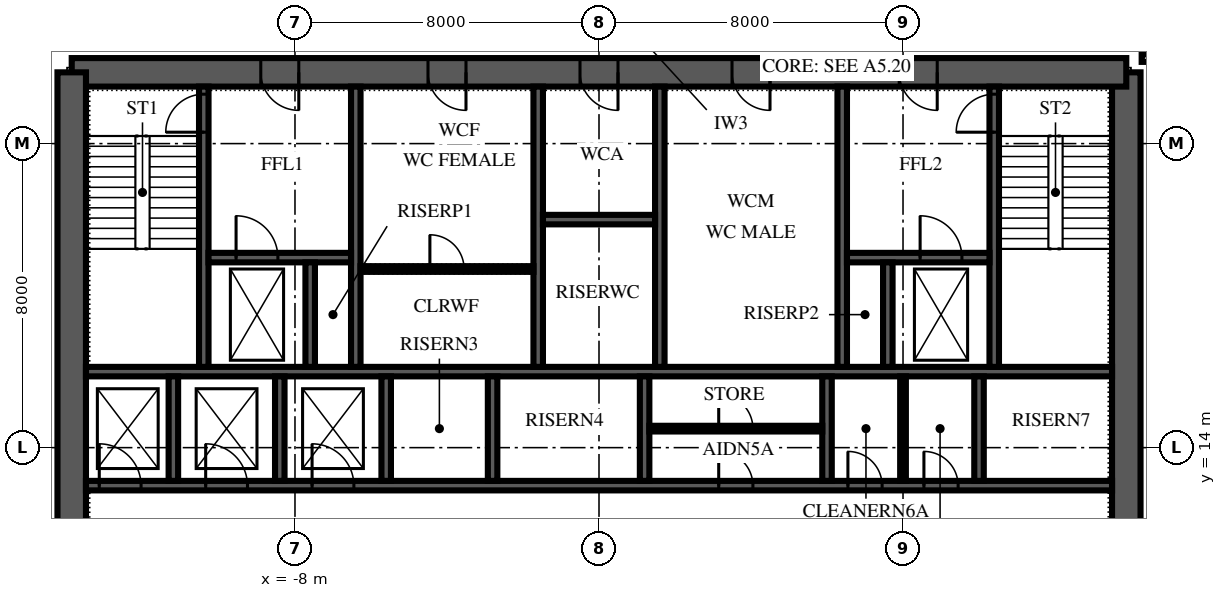
"""IFC4 building model, lengths in metres.
Left out: names, types, materials, properties, quantities, classifications, styles, units other than length and angle.
Written with IfcOpenShell. Run it as: python <this file> out.ifc"""

import sys

from ifc_helpers import new_model, si_unit, direction, frame, frame_2d, origin, place, context, subcontext, project, spatial, polyline, rectangle, outline, extrude, element, fill, save


model = new_model("IFC4")
c1 = context("Model", 3, precision=1e-05, world=origin(), true_north=direction((0.0, 1.0)))
c2 = subcontext(c1, "Body", "Model", "MODEL_VIEW")
j1 = project(units=[si_unit("LENGTHUNIT", "METRE"), si_unit("PLANEANGLEUNIT", "RADIAN")], contexts=[c1])
p1 = place(None, origin())
s1 = spatial("IfcSite", under=j1, at=p1, CompositionType="ELEMENT")
p2 = place(p1, origin())
s2 = spatial("IfcBuilding", under=s1, at=p2, CompositionType="ELEMENT")
p3 = place(p2, frame((0.0, 0.0, 139.0)))
s3 = spatial("IfcBuildingStorey", under=s2, at=p3, CompositionType="ELEMENT", Elevation=139.0)
p4 = place(p3, frame((13.875, 6.125, 0.0), z_axis=(0.0, 0.0, 1.0), x_axis=(0.0, 1.0, 0.0)))
e1 = element("IfcWall", 1, at=p4, inside=s3, PredefinedType="SHEAR", context=c2, shape_type="SweptSolid", body=[
    extrude(outline(polyline([(0.0, -0.375), (17.75, -0.375), (17.75, 0.0), (17.375, 0.0), (17.375, 0.375), (0.375, 0.375), (0.375, 0.0), (0.0, 0.0), (0.0, -0.375)])), origin(), (0.0, 0.0, 1.0), 4.0),
])
p5 = place(p4, frame((4.175, 0.0, 0.0)))
e2 = element("IfcOpeningElement", 2, at=p5, cuts=e1, PredefinedType="OPENING", context=c2, shape_type="SweptSolid", body=[
    extrude(rectangle(XDim=1.8, YDim=2.4, at=frame_2d((0.9, 1.2))), frame((0.0, 0.39, 0.0), z_axis=(0.0, -1.0, 0.0), x_axis=(1.0, 0.0, 0.0)), (0.0, 0.0, 1.0), 0.78),
])
p6 = place(p3, frame((13.875, 23.875, 0.0), z_axis=(0.0, 0.0, 1.0), x_axis=(-1.0, 0.0, 0.0)))
e3 = element("IfcWall", 3, at=p6, inside=s3, PredefinedType="SHEAR", context=c2, shape_type="SweptSolid", body=[
    extrude(rectangle(XDim=27.75, YDim=0.75, at=frame_2d((13.875, 0.0))), origin(), (0.0, 0.0, 1.0), 4.0),
])
p7 = place(p6, frame((21.775, 0.0, 0.0)))
e4 = element("IfcOpeningElement", 4, at=p7, cuts=e3, PredefinedType="OPENING", context=c2, shape_type="SweptSolid", body=[
    extrude(rectangle(XDim=1.0, YDim=2.1, at=frame_2d((0.5, 1.05))), frame((0.0, 0.39, 0.0), z_axis=(0.0, -1.0, 0.0), x_axis=(1.0, 0.0, 0.0)), (0.0, 0.0, 1.0), 0.78),
])
p8 = place(p6, frame((4.975, 0.0, 0.0)))
e5 = element("IfcOpeningElement", 5, at=p8, cuts=e3, PredefinedType="OPENING", context=c2, shape_type="SweptSolid", body=[
    extrude(rectangle(XDim=1.0, YDim=2.1, at=frame_2d((0.5, 1.05))), frame((0.0, 0.39, 0.0), z_axis=(0.0, -1.0, 0.0), x_axis=(1.0, 0.0, 0.0)), (0.0, 0.0, 1.0), 0.78),
])
p9 = place(p6, frame((17.375, 0.0, 0.0)))
e6 = element("IfcOpeningElement", 6, at=p9, cuts=e3, PredefinedType="OPENING", context=c2, shape_type="SweptSolid", body=[
    extrude(rectangle(XDim=1.0, YDim=2.1, at=frame_2d((0.5, 1.05))), frame((0.0, 0.39, 0.0), z_axis=(0.0, -1.0, 0.0), x_axis=(1.0, 0.0, 0.0)), (0.0, 0.0, 1.0), 0.78),
])
p10 = place(p6, frame((13.375, 0.0, 0.0)))
e7 = element("IfcOpeningElement", 7, at=p10, cuts=e3, PredefinedType="OPENING", context=c2, shape_type="SweptSolid", body=[
    extrude(rectangle(XDim=1.0, YDim=2.1, at=frame_2d((0.5, 1.05))), frame((0.0, 0.39, 0.0), z_axis=(0.0, -1.0, 0.0), x_axis=(1.0, 0.0, 0.0)), (0.0, 0.0, 1.0), 0.78),
])
p11 = place(p6, frame((9.375, 0.0, 0.0)))
e8 = element("IfcOpeningElement", 8, at=p11, cuts=e3, PredefinedType="OPENING", context=c2, shape_type="SweptSolid", body=[
    extrude(rectangle(XDim=1.0, YDim=2.1, at=frame_2d((0.5, 1.05))), frame((0.0, 0.39, 0.0), z_axis=(0.0, -1.0, 0.0), x_axis=(1.0, 0.0, 0.0)), (0.0, 0.0, 1.0), 0.78),
])
p12 = place(p3, frame((-13.875, 23.875, 0.0), z_axis=(0.0, 0.0, 1.0), x_axis=(0.0, -1.0, 0.0)))
e9 = element("IfcWall", 9, at=p12, inside=s3, PredefinedType="SHEAR", context=c2, shape_type="SweptSolid", body=[
    extrude(outline(polyline([(0.0, -0.375), (17.75, -0.375), (17.75, 0.0), (17.375, 0.0), (17.375, 0.375), (0.375, 0.375), (0.375, 0.0), (0.0, 0.0), (0.0, -0.375)])), origin(), (0.0, 0.0, 1.0), 4.0),
])
p13 = place(p12, frame((11.775, 0.0, 0.0)))
e10 = element("IfcOpeningElement", 10, at=p13, cuts=e9, PredefinedType="OPENING", context=c2, shape_type="SweptSolid", body=[
    extrude(rectangle(XDim=1.8, YDim=2.4, at=frame_2d((0.9, 1.2))), frame((0.0, 0.39, 0.0), z_axis=(0.0, -1.0, 0.0), x_axis=(1.0, 0.0, 0.0)), (0.0, 0.0, 1.0), 0.78),
])
p14 = place(p3, frame((-13.5, 13.0, 0.0), z_axis=(0.0, 0.0, 1.0), x_axis=(1.0, 0.0, 0.0)))
e11 = element("IfcWall", 11, at=p14, inside=s3, PredefinedType="SHEAR", context=c2, shape_type="SweptSolid", body=[
    extrude(rectangle(XDim=27.0, YDim=0.25, at=frame_2d((13.5, 0.0))), origin(), (0.0, 0.0, 1.0), 4.0),
])
p15 = place(p14, frame((0.35, 0.0, 0.0)))
e12 = element("IfcOpeningElement", 12, at=p15, cuts=e11, PredefinedType="OPENING", context=c2, shape_type="SweptSolid", body=[
    extrude(rectangle(XDim=1.1, YDim=2.1, at=frame_2d((0.55, 1.05))), frame((0.0, 0.14, 0.0), z_axis=(0.0, -1.0, 0.0), x_axis=(1.0, 0.0, 0.0)), (0.0, 0.0, 1.0), 0.28),
])
p16 = place(p14, frame((3.15, 0.0, 0.0)))
e13 = element("IfcOpeningElement", 13, at=p16, cuts=e11, PredefinedType="OPENING", context=c2, shape_type="SweptSolid", body=[
    extrude(rectangle(XDim=1.1, YDim=2.1, at=frame_2d((0.55, 1.05))), frame((0.0, 0.14, 0.0), z_axis=(0.0, -1.0, 0.0), x_axis=(1.0, 0.0, 0.0)), (0.0, 0.0, 1.0), 0.28),
])
p17 = place(p14, frame((5.95, 0.0, 0.0)))
e14 = element("IfcOpeningElement", 14, at=p17, cuts=e11, PredefinedType="OPENING", context=c2, shape_type="SweptSolid", body=[
    extrude(rectangle(XDim=1.1, YDim=2.1, at=frame_2d((0.55, 1.05))), frame((0.0, 0.14, 0.0), z_axis=(0.0, -1.0, 0.0), x_axis=(1.0, 0.0, 0.0)), (0.0, 0.0, 1.0), 0.28),
])
p18 = place(p14, frame((16.65, 0.0, 0.0)))
e15 = element("IfcOpeningElement", 15, at=p18, cuts=e11, PredefinedType="OPENING", context=c2, shape_type="SweptSolid", body=[
    extrude(rectangle(XDim=0.9, YDim=2.1, at=frame_2d((0.45, 1.05))), frame((0.0, 0.14, 0.0), z_axis=(0.0, -1.0, 0.0), x_axis=(1.0, 0.0, 0.0)), (0.0, 0.0, 1.0), 0.28),
])
p19 = place(p14, frame((20.05, 0.0, 0.0)))
e16 = element("IfcOpeningElement", 16, at=p19, cuts=e11, PredefinedType="OPENING", context=c2, shape_type="SweptSolid", body=[
    extrude(rectangle(XDim=0.9, YDim=2.1, at=frame_2d((0.45, 1.05))), frame((0.0, 0.14, 0.0), z_axis=(0.0, -1.0, 0.0), x_axis=(1.0, 0.0, 0.0)), (0.0, 0.0, 1.0), 0.28),
])
p20 = place(p14, frame((22.05, 0.0, 0.0)))
e17 = element("IfcOpeningElement", 17, at=p20, cuts=e11, PredefinedType="OPENING", context=c2, shape_type="SweptSolid", body=[
    extrude(rectangle(XDim=0.9, YDim=2.1, at=frame_2d((0.45, 1.05))), frame((0.0, 0.14, 0.0), z_axis=(0.0, -1.0, 0.0), x_axis=(1.0, 0.0, 0.0)), (0.0, 0.0, 1.0), 0.28),
])
p21 = place(p3, frame((-13.5, 16.0, 0.0), z_axis=(0.0, 0.0, 1.0), x_axis=(1.0, 0.0, 0.0)))
e18 = element("IfcWall", 18, at=p21, inside=s3, PredefinedType="SHEAR", context=c2, shape_type="SweptSolid", body=[
    extrude(rectangle(XDim=27.0, YDim=0.25, at=frame_2d((13.5, 0.0))), origin(), (0.0, 0.0, 1.0), 4.0),
])
for number, where, z_axis, x_axis in (
    (19, (-11.2, 13.125, 0.0), (0.0, 0.0, 1.0), (0.0, 1.0, 0.0)),
    (20, (-8.4, 13.125, 0.0), (0.0, 0.0, 1.0), (0.0, 1.0, 0.0)),
    (21, (-5.6, 13.125, 0.0), (0.0, 0.0, 1.0), (0.0, 1.0, 0.0)),
    (22, (-2.8, 13.125, 0.0), (0.0, 0.0, 1.0), (0.0, 1.0, 0.0)),
    (23, (1.2, 13.125, 0.0), (0.0, 0.0, 1.0), (0.0, 1.0, 0.0)),
    (24, (6.0, 13.125, 0.0), (0.0, 0.0, 1.0), (0.0, 1.0, 0.0)),
    (25, (10.0, 13.125, 0.0), (0.0, 0.0, 1.0), (0.0, 1.0, 0.0)),
):
    element("IfcWall", number, at=place(p3, frame(where, z_axis=z_axis, x_axis=x_axis)), inside=s3, PredefinedType="SHEAR", context=c2, shape_type="SweptSolid", body=[
        extrude(rectangle(XDim=2.75, YDim=0.25, at=frame_2d((1.375, 0.0))), origin(), (0.0, 0.0, 1.0), 4.0),
    ])
p22 = place(p3, frame((-10.4, 16.125, 0.0), z_axis=(0.0, 0.0, 1.0), x_axis=(0.0, 1.0, 0.0)))
e26 = element("IfcWall", 26, at=p22, inside=s3, PredefinedType="SHEAR", context=c2, shape_type="SweptSolid", body=[
    extrude(rectangle(XDim=7.375, YDim=0.25, at=frame_2d((3.688, 0.0))), origin(), (0.0, 0.0, 1.0), 4.0),
])
p23 = place(p22, frame((6.175, 0.0, 0.0)))
e27 = element("IfcOpeningElement", 27, at=p23, cuts=e26, PredefinedType="OPENING", context=c2, shape_type="SweptSolid", body=[
    extrude(rectangle(XDim=1.0, YDim=2.1, at=frame_2d((0.5, 1.05))), frame((0.0, 0.14, 0.0), z_axis=(0.0, -1.0, 0.0), x_axis=(1.0, 0.0, 0.0)), (0.0, 0.0, 1.0), 0.28),
])
for number, where, z_axis, x_axis in (
    (28, (-6.4, 16.125, 0.0), (0.0, 0.0, 1.0), (0.0, 1.0, 0.0)),
    (29, (-1.6, 16.125, 0.0), (0.0, 0.0, 1.0), (0.0, 1.0, 0.0)),
    (30, (1.6, 16.125, 0.0), (0.0, 0.0, 1.0), (0.0, 1.0, 0.0)),
    (31, (6.4, 16.125, 0.0), (0.0, 0.0, 1.0), (0.0, 1.0, 0.0)),
):
    element("IfcWall", number, at=place(p3, frame(where, z_axis=z_axis, x_axis=x_axis)), inside=s3, PredefinedType="SHEAR", context=c2, shape_type="SweptSolid", body=[
        extrude(rectangle(XDim=7.375, YDim=0.25, at=frame_2d((3.688, 0.0))), origin(), (0.0, 0.0, 1.0), 4.0),
    ])
p24 = place(p3, frame((10.4, 16.125, 0.0), z_axis=(0.0, 0.0, 1.0), x_axis=(0.0, 1.0, 0.0)))
e32 = element("IfcWall", 32, at=p24, inside=s3, PredefinedType="SHEAR", context=c2, shape_type="SweptSolid", body=[
    extrude(rectangle(XDim=7.375, YDim=0.25, at=frame_2d((3.688, 0.0))), origin(), (0.0, 0.0, 1.0), 4.0),
])
p25 = place(p24, frame((6.175, 0.0, 0.0)))
e33 = element("IfcOpeningElement", 33, at=p25, cuts=e32, PredefinedType="OPENING", context=c2, shape_type="SweptSolid", body=[
    extrude(rectangle(XDim=1.0, YDim=2.1, at=frame_2d((0.5, 1.05))), frame((0.0, 0.14, 0.0), z_axis=(0.0, -1.0, 0.0), x_axis=(1.0, 0.0, 0.0)), (0.0, 0.0, 1.0), 0.28),
])
p26 = place(p3, frame((-10.275, 19.0, 0.0), z_axis=(0.0, 0.0, 1.0), x_axis=(1.0, 0.0, 0.0)))
e34 = element("IfcWall", 34, at=p26, inside=s3, PredefinedType="SHEAR", context=c2, shape_type="SweptSolid", body=[
    extrude(rectangle(XDim=3.75, YDim=0.25, at=frame_2d((1.875, 0.0))), origin(), (0.0, 0.0, 1.0), 4.0),
])
p27 = place(p26, frame((0.725, 0.0, 0.0)))
e35 = element("IfcOpeningElement", 35, at=p27, cuts=e34, PredefinedType="OPENING", context=c2, shape_type="SweptSolid", body=[
    extrude(rectangle(XDim=1.1, YDim=2.1, at=frame_2d((0.55, 1.05))), frame((0.0, 0.14, 0.0), z_axis=(0.0, -1.0, 0.0), x_axis=(1.0, 0.0, 0.0)), (0.0, 0.0, 1.0), 0.28),
])
p28 = place(p3, frame((6.525, 19.0, 0.0), z_axis=(0.0, 0.0, 1.0), x_axis=(1.0, 0.0, 0.0)))
e36 = element("IfcWall", 36, at=p28, inside=s3, PredefinedType="SHEAR", context=c2, shape_type="SweptSolid", body=[
    extrude(rectangle(XDim=3.75, YDim=0.25, at=frame_2d((1.875, 0.0))), origin(), (0.0, 0.0, 1.0), 4.0),
])
p29 = place(p28, frame((1.925, 0.0, 0.0)))
e37 = element("IfcOpeningElement", 37, at=p29, cuts=e36, PredefinedType="OPENING", context=c2, shape_type="SweptSolid", body=[
    extrude(rectangle(XDim=1.1, YDim=2.1, at=frame_2d((0.55, 1.05))), frame((0.0, 0.14, 0.0), z_axis=(0.0, -1.0, 0.0), x_axis=(1.0, 0.0, 0.0)), (0.0, 0.0, 1.0), 0.28),
])
for number, where, z_axis, x_axis in (
    (38, (-7.6, 16.125, 0.0), (0.0, 0.0, 1.0), (0.0, 1.0, 0.0)),
    (39, (7.6, 16.125, 0.0), (0.0, 0.0, 1.0), (0.0, 1.0, 0.0)),
):
    element("IfcWall", number, at=place(p3, frame(where, z_axis=z_axis, x_axis=x_axis)), inside=s3, PredefinedType="SHEAR", context=c2, shape_type="SweptSolid", body=[
        extrude(rectangle(XDim=2.75, YDim=0.25, at=frame_2d((1.375, 0.0))), origin(), (0.0, 0.0, 1.0), 4.0),
    ])
p30 = place(p3, frame((-1.475, 20.0, 0.0), z_axis=(0.0, 0.0, 1.0), x_axis=(1.0, 0.0, 0.0)))
e40 = element("IfcWall", 40, at=p30, inside=s3, PredefinedType="SHEAR", context=c2, shape_type="SweptSolid", body=[
    extrude(rectangle(XDim=2.95, YDim=0.25, at=frame_2d((1.475, 0.0))), origin(), (0.0, 0.0, 1.0), 4.0),
])
p31 = place(p3, frame((-6.275, 18.7, 0.0), z_axis=(0.0, 0.0, 1.0), x_axis=(1.0, 0.0, 0.0)))
e41 = element("IfcWall", 41, at=p31, inside=s3, PredefinedType="PARTITIONING", context=c2, shape_type="SweptSolid", body=[
    extrude(rectangle(XDim=4.55, YDim=0.15, at=frame_2d((2.275, 0.0))), origin(), (0.0, 0.0, 1.0), 3.85),
])
p32 = place(p31, frame((1.825, 0.0, 0.0)))
e42 = element("IfcOpeningElement", 42, at=p32, cuts=e41, PredefinedType="OPENING", context=c2, shape_type="SweptSolid", body=[
    extrude(rectangle(XDim=0.9, YDim=2.1, at=frame_2d((0.45, 1.05))), frame((0.0, 0.09, 0.0), z_axis=(0.0, -1.0, 0.0), x_axis=(1.0, 0.0, 0.0)), (0.0, 0.0, 1.0), 0.18),
])
p33 = place(p3, frame((1.325, 14.5, 0.0), z_axis=(0.0, 0.0, 1.0), x_axis=(1.0, 0.0, 0.0)))
e43 = element("IfcWall", 43, at=p33, inside=s3, PredefinedType="PARTITIONING", context=c2, shape_type="SweptSolid", body=[
    extrude(rectangle(XDim=4.55, YDim=0.15, at=frame_2d((2.275, 0.0))), origin(), (0.0, 0.0, 1.0), 3.85),
])
p34 = place(p33, frame((1.825, 0.0, 0.0)))
e44 = element("IfcOpeningElement", 44, at=p34, cuts=e43, PredefinedType="OPENING", context=c2, shape_type="SweptSolid", body=[
    extrude(rectangle(XDim=0.9, YDim=2.1, at=frame_2d((0.45, 1.05))), frame((0.0, 0.09, 0.0), z_axis=(0.0, -1.0, 0.0), x_axis=(1.0, 0.0, 0.0)), (0.0, 0.0, 1.0), 0.18),
])
p35 = place(p3, frame((8.0, 13.125, 0.0), z_axis=(0.0, 0.0, 1.0), x_axis=(0.0, 1.0, 0.0)))
e45 = element("IfcWall", 45, at=p35, inside=s3, PredefinedType="PARTITIONING", context=c2, shape_type="SweptSolid", body=[
    extrude(rectangle(XDim=2.75, YDim=0.15, at=frame_2d((1.375, 0.0))), origin(), (0.0, 0.0, 1.0), 3.85),
])
p36 = place(p3, frame((14.28, 24.25, 0.0), z_axis=(0.0, 0.0, 1.0), x_axis=(1.0, 0.0, 0.0)))
e46 = element("IfcWall", 46, at=p36, inside=s3, PredefinedType="PARTITIONING", context=c2, shape_type="SweptSolid", body=[
    extrude(rectangle(XDim=1.82, YDim=0.2, at=frame_2d((0.91, 0.0))), origin(), (0.0, 0.0, 1.0), 3.4),
])
p37 = place(p7, origin())
e47 = element("IfcDoor", 47, at=p37, inside=s3, OperationType="SINGLE_SWING_RIGHT", PredefinedType="DOOR", context=c2, shape_type="SweptSolid", body=[
    extrude(rectangle(XDim=1.0, YDim=2.1, at=frame_2d((0.5, 1.05))), frame((0.0, 0.375, 0.0), z_axis=(0.0, -1.0, 0.0), x_axis=(1.0, 0.0, 0.0)), (0.0, 0.0, 1.0), 0.75),
])
fill(e4, e47)
p38 = place(p8, origin())
e48 = element("IfcDoor", 48, at=p38, inside=s3, OperationType="SINGLE_SWING_RIGHT", PredefinedType="DOOR", context=c2, shape_type="SweptSolid", body=[
    extrude(rectangle(XDim=1.0, YDim=2.1, at=frame_2d((0.5, 1.05))), frame((0.0, 0.375, 0.0), z_axis=(0.0, -1.0, 0.0), x_axis=(1.0, 0.0, 0.0)), (0.0, 0.0, 1.0), 0.75),
])
fill(e5, e48)
p39 = place(p9, origin())
e49 = element("IfcDoor", 49, at=p39, inside=s3, OperationType="SINGLE_SWING_LEFT", PredefinedType="DOOR", context=c2, shape_type="SweptSolid", body=[
    extrude(rectangle(XDim=1.0, YDim=2.1, at=frame_2d((0.5, 1.05))), frame((0.0, 0.375, 0.0), z_axis=(0.0, -1.0, 0.0), x_axis=(1.0, 0.0, 0.0)), (0.0, 0.0, 1.0), 0.75),
])
fill(e6, e49)
p40 = place(p10, origin())
e50 = element("IfcDoor", 50, at=p40, inside=s3, OperationType="SINGLE_SWING_LEFT", PredefinedType="DOOR", context=c2, shape_type="SweptSolid", body=[
    extrude(rectangle(XDim=1.0, YDim=2.1, at=frame_2d((0.5, 1.05))), frame((0.0, 0.375, 0.0), z_axis=(0.0, -1.0, 0.0), x_axis=(1.0, 0.0, 0.0)), (0.0, 0.0, 1.0), 0.75),
])
fill(e7, e50)
p41 = place(p11, origin())
e51 = element("IfcDoor", 51, at=p41, inside=s3, OperationType="SINGLE_SWING_LEFT", PredefinedType="DOOR", context=c2, shape_type="SweptSolid", body=[
    extrude(rectangle(XDim=1.0, YDim=2.1, at=frame_2d((0.5, 1.05))), frame((0.0, 0.375, 0.0), z_axis=(0.0, -1.0, 0.0), x_axis=(1.0, 0.0, 0.0)), (0.0, 0.0, 1.0), 0.75),
])
fill(e8, e51)
p42 = place(p23, origin())
e52 = element("IfcDoor", 52, at=p42, inside=s3, OperationType="SINGLE_SWING_LEFT", PredefinedType="DOOR", context=c2, shape_type="SweptSolid", body=[
    extrude(rectangle(XDim=1.0, YDim=2.1, at=frame_2d((0.5, 1.05))), frame((0.0, 0.125, 0.0), z_axis=(0.0, -1.0, 0.0), x_axis=(1.0, 0.0, 0.0)), (0.0, 0.0, 1.0), 0.25),
])
fill(e27, e52)
p43 = place(p25, origin())
e53 = element("IfcDoor", 53, at=p43, inside=s3, OperationType="SINGLE_SWING_LEFT", PredefinedType="DOOR", context=c2, shape_type="SweptSolid", body=[
    extrude(rectangle(XDim=1.0, YDim=2.1, at=frame_2d((0.5, 1.05))), frame((0.0, 0.125, 0.0), z_axis=(0.0, -1.0, 0.0), x_axis=(1.0, 0.0, 0.0)), (0.0, 0.0, 1.0), 0.25),
])
fill(e33, e53)
p44 = place(p15, origin())
e54 = element("IfcDoor", 54, at=p44, inside=s3, OperationType="SLIDING_TO_LEFT", PredefinedType="DOOR", context=c2, shape_type="SweptSolid", body=[
    extrude(rectangle(XDim=1.1, YDim=2.1, at=frame_2d((0.55, 1.05))), frame((0.0, 0.125, 0.0), z_axis=(0.0, -1.0, 0.0), x_axis=(1.0, 0.0, 0.0)), (0.0, 0.0, 1.0), 0.25),
])
fill(e12, e54)
p45 = place(p16, origin())
e55 = element("IfcDoor", 55, at=p45, inside=s3, OperationType="SLIDING_TO_LEFT", PredefinedType="DOOR", context=c2, shape_type="SweptSolid", body=[
    extrude(rectangle(XDim=1.1, YDim=2.1, at=frame_2d((0.55, 1.05))), frame((0.0, 0.125, 0.0), z_axis=(0.0, -1.0, 0.0), x_axis=(1.0, 0.0, 0.0)), (0.0, 0.0, 1.0), 0.25),
])
fill(e13, e55)
p46 = place(p17, origin())
e56 = element("IfcDoor", 56, at=p46, inside=s3, OperationType="SLIDING_TO_LEFT", PredefinedType="DOOR", context=c2, shape_type="SweptSolid", body=[
    extrude(rectangle(XDim=1.1, YDim=2.1, at=frame_2d((0.55, 1.05))), frame((0.0, 0.125, 0.0), z_axis=(0.0, -1.0, 0.0), x_axis=(1.0, 0.0, 0.0)), (0.0, 0.0, 1.0), 0.25),
])
fill(e14, e56)
p47 = place(p29, origin())
e57 = element("IfcDoor", 57, at=p47, inside=s3, OperationType="SLIDING_TO_RIGHT", PredefinedType="DOOR", context=c2, shape_type="SweptSolid", body=[
    extrude(rectangle(XDim=1.1, YDim=2.1, at=frame_2d((0.55, 1.05))), frame((0.0, 0.125, 0.0), z_axis=(0.0, -1.0, 0.0), x_axis=(1.0, 0.0, 0.0)), (0.0, 0.0, 1.0), 0.25),
])
fill(e37, e57)
p48 = place(p27, origin())
e58 = element("IfcDoor", 58, at=p48, inside=s3, OperationType="SLIDING_TO_RIGHT", PredefinedType="DOOR", context=c2, shape_type="SweptSolid", body=[
    extrude(rectangle(XDim=1.1, YDim=2.1, at=frame_2d((0.55, 1.05))), frame((0.0, 0.125, 0.0), z_axis=(0.0, -1.0, 0.0), x_axis=(1.0, 0.0, 0.0)), (0.0, 0.0, 1.0), 0.25),
])
fill(e35, e58)
p49 = place(p18, origin())
e59 = element("IfcDoor", 59, at=p49, inside=s3, OperationType="SINGLE_SWING_LEFT", PredefinedType="DOOR", context=c2, shape_type="SweptSolid", body=[
    extrude(rectangle(XDim=0.9, YDim=2.1, at=frame_2d((0.45, 1.05))), frame((0.0, 0.125, 0.0), z_axis=(0.0, -1.0, 0.0), x_axis=(1.0, 0.0, 0.0)), (0.0, 0.0, 1.0), 0.25),
])
fill(e15, e59)
p50 = place(p34, origin())
e60 = element("IfcDoor", 60, at=p50, inside=s3, OperationType="SINGLE_SWING_LEFT", PredefinedType="DOOR", context=c2, shape_type="SweptSolid", body=[
    extrude(rectangle(XDim=0.9, YDim=2.1, at=frame_2d((0.45, 1.05))), frame((0.0, 0.075, 0.0), z_axis=(0.0, -1.0, 0.0), x_axis=(1.0, 0.0, 0.0)), (0.0, 0.0, 1.0), 0.149),
])
fill(e44, e60)
p51 = place(p19, origin())
e61 = element("IfcDoor", 61, at=p51, inside=s3, OperationType="SINGLE_SWING_LEFT", PredefinedType="DOOR", context=c2, shape_type="SweptSolid", body=[
    extrude(rectangle(XDim=0.9, YDim=2.1, at=frame_2d((0.45, 1.05))), frame((0.0, 0.125, 0.0), z_axis=(0.0, -1.0, 0.0), x_axis=(1.0, 0.0, 0.0)), (0.0, 0.0, 1.0), 0.25),
])
fill(e16, e61)
p52 = place(p20, origin())
e62 = element("IfcDoor", 62, at=p52, inside=s3, OperationType="SINGLE_SWING_LEFT", PredefinedType="DOOR", context=c2, shape_type="SweptSolid", body=[
    extrude(rectangle(XDim=0.9, YDim=2.1, at=frame_2d((0.45, 1.05))), frame((0.0, 0.125, 0.0), z_axis=(0.0, -1.0, 0.0), x_axis=(1.0, 0.0, 0.0)), (0.0, 0.0, 1.0), 0.25),
])
fill(e17, e62)
p53 = place(p32, origin())
e63 = element("IfcDoor", 63, at=p53, inside=s3, OperationType="SINGLE_SWING_LEFT", PredefinedType="DOOR", context=c2, shape_type="SweptSolid", body=[
    extrude(rectangle(XDim=0.9, YDim=2.1, at=frame_2d((0.45, 1.05))), frame((0.0, 0.075, 0.0), z_axis=(0.0, -1.0, 0.0), x_axis=(1.0, 0.0, 0.0)), (0.0, 0.0, 1.0), 0.149),
])
fill(e42, e63)
save(model, sys.argv[1])
